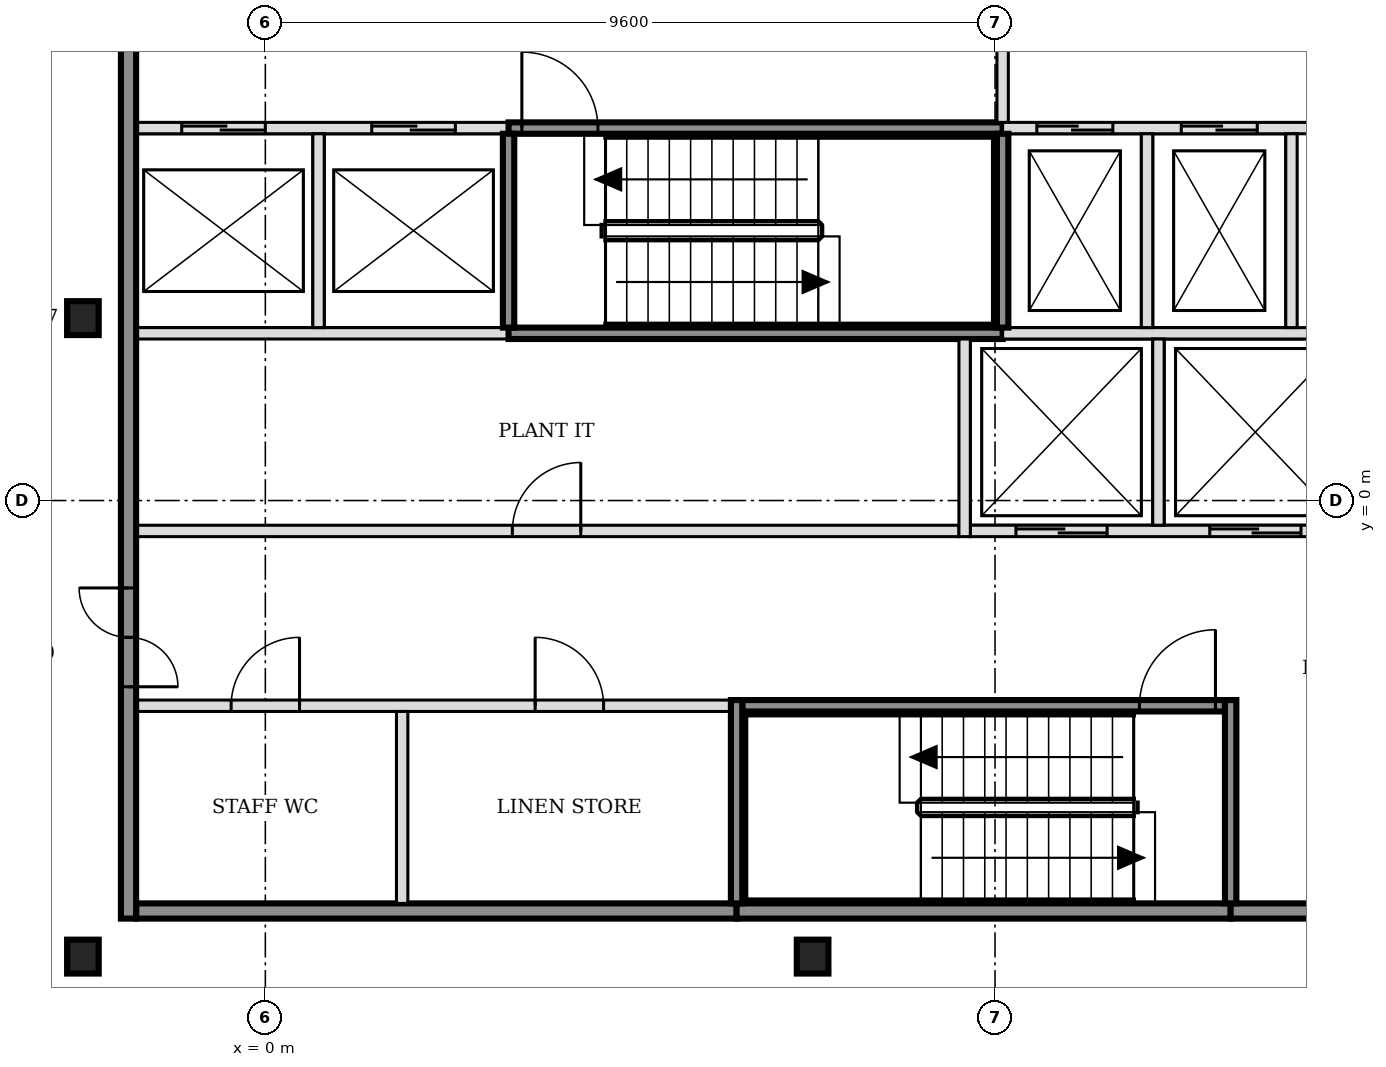
"""IFC4 building model, lengths in metres.
Left out: names, types, materials, properties, quantities, classifications, styles, units other than length and angle.
Written with IfcOpenShell. Run it as: python <this file> out.ifc"""

import sys

from ifc_helpers import new_model, si_unit, direction, frame, frame_2d, origin, origin_2d, place, context, subcontext, project, spatial, rectangle, i_section, extrude, element, fill, save


model = new_model("IFC4")
c1 = context("Model", 3, precision=1e-05, world=origin(), true_north=direction((0.0, 1.0)))
c2 = subcontext(c1, "Body", "Model", "MODEL_VIEW")
j1 = project(units=[si_unit("LENGTHUNIT", "METRE"), si_unit("PLANEANGLEUNIT", "RADIAN")], contexts=[c1])
p1 = place(None, origin())
s1 = spatial("IfcSite", under=j1, at=p1, CompositionType="ELEMENT")
p2 = place(p1, origin())
s2 = spatial("IfcBuilding", under=s1, at=p2, CompositionType="ELEMENT")
p3 = place(p2, frame((0.0, 0.0, 157.8)))
s3 = spatial("IfcBuildingStorey", under=s2, at=p3, CompositionType="ELEMENT", Elevation=157.8)
for number, where, z_axis, x_axis in (
    (1, (-2.4, -6.0, -0.15), (0.0, 0.0, 1.0), (1.0, 0.0, 0.0)),
    (2, (7.2, -6.0, -0.15), (0.0, 0.0, 1.0), (1.0, 0.0, 0.0)),
    (3, (-2.4, 2.4, -0.15), (0.0, 0.0, 1.0), (1.0, 0.0, 0.0)),
):
    element("IfcColumn", number, at=place(p3, frame(where, z_axis=z_axis, x_axis=x_axis)), inside=s3, PredefinedType="COLUMN", context=c2, shape_type="SweptSolid", body=[
        extrude(i_section(OverallWidth=0.416, OverallDepth=0.446, WebThickness=0.039, FlangeThickness=0.063, FilletRadius=0.015, at=origin_2d()), origin(), (0.0, 0.0, 1.0), 3.6),
    ])
p4 = place(p3, frame((-1.7, -5.4, 0.0), z_axis=(0.0, 0.0, 1.0), x_axis=(1.0, 0.0, 0.0)))
e4 = element("IfcWall", 4, at=p4, inside=s3, PredefinedType="SOLIDWALL", context=c2, shape_type="SweptSolid", body=[
    extrude(rectangle(XDim=7.9, YDim=0.2, at=frame_2d((3.95, 0.0))), origin(), (0.0, 0.0, 1.0), 3.45),
])
p5 = place(p3, frame((6.2, -5.4, 0.0), z_axis=(0.0, 0.0, 1.0), x_axis=(1.0, 0.0, 0.0)))
e5 = element("IfcWall", 5, at=p5, inside=s3, PredefinedType="SOLIDWALL", context=c2, shape_type="SweptSolid", body=[
    extrude(rectangle(XDim=6.5, YDim=0.2, at=frame_2d((3.25, 0.0))), origin(), (0.0, 0.0, 1.0), 3.45),
])
p6 = place(p3, frame((12.7, -5.4, 0.0), z_axis=(0.0, 0.0, 1.0), x_axis=(1.0, 0.0, 0.0)))
e6 = element("IfcWall", 6, at=p6, inside=s3, PredefinedType="SOLIDWALL", context=c2, shape_type="SweptSolid", body=[
    extrude(rectangle(XDim=3.4, YDim=0.2, at=frame_2d((1.7, 0.0))), origin(), (0.0, 0.0, 1.0), 3.45),
])
p7 = place(p3, frame((-1.7, -2.7, 0.0), z_axis=(0.0, 0.0, 1.0), x_axis=(1.0, 0.0, 0.0)))
e7 = element("IfcWall", 7, at=p7, inside=s3, PredefinedType="PARTITIONING", context=c2, shape_type="SweptSolid", body=[
    extrude(rectangle(XDim=7.825, YDim=0.15, at=frame_2d((3.913, 0.0))), origin(), (0.0, 0.0, 1.0), 3.45),
])
p8 = place(p7, frame((1.25, 0.0, 0.0)))
e8 = element("IfcOpeningElement", 8, at=p8, cuts=e7, PredefinedType="OPENING", context=c2, shape_type="SweptSolid", body=[
    extrude(rectangle(XDim=0.9, YDim=2.1, at=frame_2d((0.45, 1.05))), frame((0.0, 0.085, 0.0), z_axis=(0.0, -1.0, 0.0), x_axis=(1.0, 0.0, 0.0)), (0.0, 0.0, 1.0), 0.17),
])
p9 = place(p7, frame((5.25, 0.0, 0.0)))
e9 = element("IfcOpeningElement", 9, at=p9, cuts=e7, PredefinedType="OPENING", context=c2, shape_type="SweptSolid", body=[
    extrude(rectangle(XDim=0.9, YDim=2.1, at=frame_2d((0.45, 1.05))), frame((0.0, 0.085, 0.0), z_axis=(0.0, -1.0, 0.0), x_axis=(1.0, 0.0, 0.0)), (0.0, 0.0, 1.0), 0.17),
])
p10 = place(p3, frame((6.275, -2.7, 0.0), z_axis=(0.0, 0.0, 1.0), x_axis=(1.0, 0.0, 0.0)))
e10 = element("IfcWall", 10, at=p10, inside=s3, PredefinedType="SOLIDWALL", context=c2, shape_type="SweptSolid", body=[
    extrude(rectangle(XDim=6.35, YDim=0.15, at=frame_2d((3.175, 0.0))), origin(), (0.0, 0.0, 1.0), 3.45),
])
p11 = place(p10, frame((5.225, 0.0, 0.0)))
e11 = element("IfcOpeningElement", 11, at=p11, cuts=e10, PredefinedType="OPENING", context=c2, shape_type="SweptSolid", body=[
    extrude(rectangle(XDim=1.0, YDim=2.1, at=frame_2d((0.5, 1.05))), frame((0.0, 0.085, 0.0), z_axis=(0.0, -1.0, 0.0), x_axis=(1.0, 0.0, 0.0)), (0.0, 0.0, 1.0), 0.17),
])
p12 = place(p3, frame((-1.7, -0.4, 0.0), z_axis=(0.0, 0.0, 1.0), x_axis=(1.0, 0.0, 0.0)))
e12 = element("IfcWall", 12, at=p12, inside=s3, PredefinedType="PARTITIONING", context=c2, shape_type="SweptSolid", body=[
    extrude(rectangle(XDim=10.825, YDim=0.15, at=frame_2d((5.413, 0.0))), origin(), (0.0, 0.0, 1.0), 3.45),
])
p13 = place(p12, frame((4.95, 0.0, 0.0)))
e13 = element("IfcOpeningElement", 13, at=p13, cuts=e12, PredefinedType="OPENING", context=c2, shape_type="SweptSolid", body=[
    extrude(rectangle(XDim=0.9, YDim=2.1, at=frame_2d((0.45, 1.05))), frame((0.0, 0.085, 0.0), z_axis=(0.0, -1.0, 0.0), x_axis=(1.0, 0.0, 0.0)), (0.0, 0.0, 1.0), 0.17),
])
p14 = place(p3, frame((9.275, -0.4, 0.0), z_axis=(0.0, 0.0, 1.0), x_axis=(1.0, 0.0, 0.0)))
e14 = element("IfcWall", 14, at=p14, inside=s3, PredefinedType="SOLIDWALL", context=c2, shape_type="SweptSolid", body=[
    extrude(rectangle(XDim=4.95, YDim=0.15, at=frame_2d((2.475, 0.0))), origin(), (0.0, 0.0, 1.0), 3.45),
])
p15 = place(p14, frame((0.6, 0.0, 0.0)))
e15 = element("IfcOpeningElement", 15, at=p15, cuts=e14, PredefinedType="OPENING", context=c2, shape_type="SweptSolid", body=[
    extrude(rectangle(XDim=1.2, YDim=2.1, at=frame_2d((0.6, 1.05))), frame((0.0, 0.085, 0.0), z_axis=(0.0, -1.0, 0.0), x_axis=(1.0, 0.0, 0.0)), (0.0, 0.0, 1.0), 0.17),
])
p16 = place(p14, frame((3.15, 0.0, 0.0)))
e16 = element("IfcOpeningElement", 16, at=p16, cuts=e14, PredefinedType="OPENING", context=c2, shape_type="SweptSolid", body=[
    extrude(rectangle(XDim=1.2, YDim=2.1, at=frame_2d((0.6, 1.05))), frame((0.0, 0.085, 0.0), z_axis=(0.0, -1.0, 0.0), x_axis=(1.0, 0.0, 0.0)), (0.0, 0.0, 1.0), 0.17),
])
p17 = place(p3, frame((-1.7, 2.2, 0.0), z_axis=(0.0, 0.0, 1.0), x_axis=(1.0, 0.0, 0.0)))
e17 = element("IfcWall", 17, at=p17, inside=s3, PredefinedType="SOLIDWALL", context=c2, shape_type="SweptSolid", body=[
    extrude(rectangle(XDim=4.9, YDim=0.15, at=frame_2d((2.45, 0.0))), origin(), (0.0, 0.0, 1.0), 3.45),
])
p18 = place(p3, frame((3.2, 2.2, 0.0), z_axis=(0.0, 0.0, 1.0), x_axis=(1.0, 0.0, 0.0)))
e18 = element("IfcWall", 18, at=p18, inside=s3, PredefinedType="SOLIDWALL", context=c2, shape_type="SweptSolid", body=[
    extrude(rectangle(XDim=6.5, YDim=0.15, at=frame_2d((3.25, 0.0))), origin(), (0.0, 0.0, 1.0), 3.45),
])
p19 = place(p3, frame((9.7, 2.2, 0.0), z_axis=(0.0, 0.0, 1.0), x_axis=(1.0, 0.0, 0.0)))
e19 = element("IfcWall", 19, at=p19, inside=s3, PredefinedType="SOLIDWALL", context=c2, shape_type="SweptSolid", body=[
    extrude(rectangle(XDim=4.525, YDim=0.15, at=frame_2d((2.263, 0.0))), origin(), (0.0, 0.0, 1.0), 3.45),
])
p20 = place(p3, frame((-1.7, 4.9, 0.0), z_axis=(0.0, 0.0, 1.0), x_axis=(1.0, 0.0, 0.0)))
e20 = element("IfcWall", 20, at=p20, inside=s3, PredefinedType="SOLIDWALL", context=c2, shape_type="SweptSolid", body=[
    extrude(rectangle(XDim=4.9, YDim=0.15, at=frame_2d((2.45, 0.0))), origin(), (0.0, 0.0, 1.0), 3.45),
])
p21 = place(p20, frame((0.6, 0.0, 0.0)))
e21 = element("IfcOpeningElement", 21, at=p21, cuts=e20, PredefinedType="OPENING", context=c2, shape_type="SweptSolid", body=[
    extrude(rectangle(XDim=1.1, YDim=2.1, at=frame_2d((0.55, 1.05))), frame((0.0, 0.085, 0.0), z_axis=(0.0, -1.0, 0.0), x_axis=(1.0, 0.0, 0.0)), (0.0, 0.0, 1.0), 0.17),
])
p22 = place(p20, frame((3.1, 0.0, 0.0)))
e22 = element("IfcOpeningElement", 22, at=p22, cuts=e20, PredefinedType="OPENING", context=c2, shape_type="SweptSolid", body=[
    extrude(rectangle(XDim=1.1, YDim=2.1, at=frame_2d((0.55, 1.05))), frame((0.0, 0.085, 0.0), z_axis=(0.0, -1.0, 0.0), x_axis=(1.0, 0.0, 0.0)), (0.0, 0.0, 1.0), 0.17),
])
p23 = place(p3, frame((3.2, 4.9, 0.0), z_axis=(0.0, 0.0, 1.0), x_axis=(1.0, 0.0, 0.0)))
e23 = element("IfcWall", 23, at=p23, inside=s3, PredefinedType="SOLIDWALL", context=c2, shape_type="SweptSolid", body=[
    extrude(rectangle(XDim=6.5, YDim=0.15, at=frame_2d((3.25, 0.0))), origin(), (0.0, 0.0, 1.0), 3.45),
])
p24 = place(p23, frame((0.175, 0.0, 0.0)))
e24 = element("IfcOpeningElement", 24, at=p24, cuts=e23, PredefinedType="OPENING", context=c2, shape_type="SweptSolid", body=[
    extrude(rectangle(XDim=1.0, YDim=2.1, at=frame_2d((0.5, 1.05))), frame((0.0, 0.085, 0.0), z_axis=(0.0, -1.0, 0.0), x_axis=(1.0, 0.0, 0.0)), (0.0, 0.0, 1.0), 0.17),
])
p25 = place(p3, frame((9.7, 4.9, 0.0), z_axis=(0.0, 0.0, 1.0), x_axis=(1.0, 0.0, 0.0)))
e25 = element("IfcWall", 25, at=p25, inside=s3, PredefinedType="SOLIDWALL", context=c2, shape_type="SweptSolid", body=[
    extrude(rectangle(XDim=6.4, YDim=0.15, at=frame_2d((3.2, 0.0))), origin(), (0.0, 0.0, 1.0), 3.45),
])
p26 = place(p25, frame((0.45, 0.0, 0.0)))
e26 = element("IfcOpeningElement", 26, at=p26, cuts=e25, PredefinedType="OPENING", context=c2, shape_type="SweptSolid", body=[
    extrude(rectangle(XDim=1.0, YDim=2.1, at=frame_2d((0.5, 1.05))), frame((0.0, 0.085, 0.0), z_axis=(0.0, -1.0, 0.0), x_axis=(1.0, 0.0, 0.0)), (0.0, 0.0, 1.0), 0.17),
])
p27 = place(p25, frame((2.35, 0.0, 0.0)))
e27 = element("IfcOpeningElement", 27, at=p27, cuts=e25, PredefinedType="OPENING", context=c2, shape_type="SweptSolid", body=[
    extrude(rectangle(XDim=1.0, YDim=2.1, at=frame_2d((0.5, 1.05))), frame((0.0, 0.085, 0.0), z_axis=(0.0, -1.0, 0.0), x_axis=(1.0, 0.0, 0.0)), (0.0, 0.0, 1.0), 0.17),
])
p28 = place(p25, frame((4.7, 0.0, 0.0)))
e28 = element("IfcOpeningElement", 28, at=p28, cuts=e25, PredefinedType="OPENING", context=c2, shape_type="SweptSolid", body=[
    extrude(rectangle(XDim=0.9, YDim=2.1, at=frame_2d((0.45, 1.05))), frame((0.0, 0.085, 0.0), z_axis=(0.0, -1.0, 0.0), x_axis=(1.0, 0.0, 0.0)), (0.0, 0.0, 1.0), 0.17),
])
p29 = place(p3, frame((-1.8, -5.5, 0.0), z_axis=(0.0, 0.0, 1.0), x_axis=(0.0, 1.0, 0.0)))
e29 = element("IfcWall", 29, at=p29, inside=s3, PredefinedType="SOLIDWALL", context=c2, shape_type="SweptSolid", body=[
    extrude(rectangle(XDim=15.8, YDim=0.2, at=frame_2d((7.9, 0.0))), origin(), (0.0, 0.0, 1.0), 3.45),
])
p30 = place(p29, frame((3.05, 0.0, 0.0)))
e30 = element("IfcOpeningElement", 30, at=p30, cuts=e29, PredefinedType="OPENING", context=c2, shape_type="SweptSolid", body=[
    extrude(rectangle(XDim=1.3, YDim=2.1, at=frame_2d((0.65, 1.05))), frame((0.0, 0.11, 0.0), z_axis=(0.0, -1.0, 0.0), x_axis=(1.0, 0.0, 0.0)), (0.0, 0.0, 1.0), 0.22),
])
p31 = place(p29, frame((11.45, 0.0, 0.0)))
e31 = element("IfcOpeningElement", 31, at=p31, cuts=e29, PredefinedType="OPENING", context=c2, shape_type="SweptSolid", body=[
    extrude(rectangle(XDim=1.3, YDim=2.1, at=frame_2d((0.65, 1.05))), frame((0.0, 0.11, 0.0), z_axis=(0.0, -1.0, 0.0), x_axis=(1.0, 0.0, 0.0)), (0.0, 0.0, 1.0), 0.22),
])
p32 = place(p3, frame((0.7, 2.275, 0.0), z_axis=(0.0, 0.0, 1.0), x_axis=(0.0, 1.0, 0.0)))
e32 = element("IfcWall", 32, at=p32, inside=s3, PredefinedType="SOLIDWALL", context=c2, shape_type="SweptSolid", body=[
    extrude(rectangle(XDim=2.55, YDim=0.15, at=frame_2d((1.275, 0.0))), origin(), (0.0, 0.0, 1.0), 3.45),
])
p33 = place(p3, frame((1.8, -5.3, 0.0), z_axis=(0.0, 0.0, 1.0), x_axis=(0.0, 1.0, 0.0)))
e33 = element("IfcWall", 33, at=p33, inside=s3, PredefinedType="PARTITIONING", context=c2, shape_type="SweptSolid", body=[
    extrude(rectangle(XDim=2.525, YDim=0.15, at=frame_2d((1.263, 0.0))), origin(), (0.0, 0.0, 1.0), 3.45),
])
p34 = place(p3, frame((3.2, 2.275, 0.0), z_axis=(0.0, 0.0, 1.0), x_axis=(0.0, 1.0, 0.0)))
e34 = element("IfcWall", 34, at=p34, inside=s3, PredefinedType="SOLIDWALL", context=c2, shape_type="SweptSolid", body=[
    extrude(rectangle(XDim=2.55, YDim=0.15, at=frame_2d((1.275, 0.0))), origin(), (0.0, 0.0, 1.0), 3.45),
])
p35 = place(p3, frame((6.2, -5.3, 0.0), z_axis=(0.0, 0.0, 1.0), x_axis=(0.0, 1.0, 0.0)))
e35 = element("IfcWall", 35, at=p35, inside=s3, PredefinedType="SOLIDWALL", context=c2, shape_type="SweptSolid", body=[
    extrude(rectangle(XDim=2.675, YDim=0.15, at=frame_2d((1.337, 0.0))), origin(), (0.0, 0.0, 1.0), 3.45),
])
p36 = place(p3, frame((9.2, -0.475, 0.0), z_axis=(0.0, 0.0, 1.0), x_axis=(0.0, 1.0, 0.0)))
e36 = element("IfcWall", 36, at=p36, inside=s3, PredefinedType="SOLIDWALL", context=c2, shape_type="SweptSolid", body=[
    extrude(rectangle(XDim=2.6, YDim=0.15, at=frame_2d((1.3, 0.0))), origin(), (0.0, 0.0, 1.0), 3.45),
])
p37 = place(p3, frame((9.7, 2.275, 0.0), z_axis=(0.0, 0.0, 1.0), x_axis=(0.0, 1.0, 0.0)))
e37 = element("IfcWall", 37, at=p37, inside=s3, PredefinedType="SOLIDWALL", context=c2, shape_type="SweptSolid", body=[
    extrude(rectangle(XDim=2.55, YDim=0.15, at=frame_2d((1.275, 0.0))), origin(), (0.0, 0.0, 1.0), 3.45),
])
p38 = place(p3, frame((9.7, 4.975, 0.0), z_axis=(0.0, 0.0, 1.0), x_axis=(0.0, 1.0, 0.0)))
e38 = element("IfcWall", 38, at=p38, inside=s3, PredefinedType="SOLIDWALL", context=c2, shape_type="SweptSolid", body=[
    extrude(rectangle(XDim=2.45, YDim=0.15, at=frame_2d((1.225, 0.0))), origin(), (0.0, 0.0, 1.0), 3.45),
])
p39 = place(p3, frame((11.6, 2.275, 0.0), z_axis=(0.0, 0.0, 1.0), x_axis=(0.0, 1.0, 0.0)))
e39 = element("IfcWall", 39, at=p39, inside=s3, PredefinedType="SOLIDWALL", context=c2, shape_type="SweptSolid", body=[
    extrude(rectangle(XDim=2.55, YDim=0.15, at=frame_2d((1.275, 0.0))), origin(), (0.0, 0.0, 1.0), 3.45),
])
p40 = place(p3, frame((11.75, -0.325, 0.0), z_axis=(0.0, 0.0, 1.0), x_axis=(0.0, 1.0, 0.0)))
e40 = element("IfcWall", 40, at=p40, inside=s3, PredefinedType="SOLIDWALL", context=c2, shape_type="SweptSolid", body=[
    extrude(rectangle(XDim=2.45, YDim=0.15, at=frame_2d((1.225, 0.0))), origin(), (0.0, 0.0, 1.0), 3.45),
])
p41 = place(p3, frame((12.7, -5.3, 0.0), z_axis=(0.0, 0.0, 1.0), x_axis=(0.0, 1.0, 0.0)))
e41 = element("IfcWall", 41, at=p41, inside=s3, PredefinedType="SOLIDWALL", context=c2, shape_type="SweptSolid", body=[
    extrude(rectangle(XDim=2.675, YDim=0.15, at=frame_2d((1.337, 0.0))), origin(), (0.0, 0.0, 1.0), 3.45),
])
p42 = place(p3, frame((13.5, 2.275, 0.0), z_axis=(0.0, 0.0, 1.0), x_axis=(0.0, 1.0, 0.0)))
e42 = element("IfcWall", 42, at=p42, inside=s3, PredefinedType="SOLIDWALL", context=c2, shape_type="SweptSolid", body=[
    extrude(rectangle(XDim=2.55, YDim=0.15, at=frame_2d((1.275, 0.0))), origin(), (0.0, 0.0, 1.0), 3.45),
])
p43 = place(p15, origin())
e43 = element("IfcDoor", 43, at=p43, inside=s3, OperationType="DOUBLE_DOOR_SLIDING", PredefinedType="DOOR", context=c2, shape_type="SweptSolid", body=[
    extrude(rectangle(XDim=1.2, YDim=2.1, at=frame_2d((0.6, 1.05))), frame((0.0, 0.025, 0.0), z_axis=(0.0, -1.0, 0.0), x_axis=(1.0, 0.0, 0.0)), (0.0, 0.0, 1.0), 0.05),
])
fill(e15, e43)
p44 = place(p16, origin())
e44 = element("IfcDoor", 44, at=p44, inside=s3, OperationType="DOUBLE_DOOR_SLIDING", PredefinedType="DOOR", context=c2, shape_type="SweptSolid", body=[
    extrude(rectangle(XDim=1.2, YDim=2.1, at=frame_2d((0.6, 1.05))), frame((0.0, 0.025, 0.0), z_axis=(0.0, -1.0, 0.0), x_axis=(1.0, 0.0, 0.0)), (0.0, 0.0, 1.0), 0.05),
])
fill(e16, e44)
p45 = place(p21, origin())
e45 = element("IfcDoor", 45, at=p45, inside=s3, OperationType="DOUBLE_DOOR_SLIDING", PredefinedType="DOOR", context=c2, shape_type="SweptSolid", body=[
    extrude(rectangle(XDim=1.1, YDim=2.1, at=frame_2d((0.55, 1.05))), frame((0.0, 0.025, 0.0), z_axis=(0.0, -1.0, 0.0), x_axis=(1.0, 0.0, 0.0)), (0.0, 0.0, 1.0), 0.05),
])
fill(e21, e45)
p46 = place(p22, origin())
e46 = element("IfcDoor", 46, at=p46, inside=s3, OperationType="DOUBLE_DOOR_SLIDING", PredefinedType="DOOR", context=c2, shape_type="SweptSolid", body=[
    extrude(rectangle(XDim=1.1, YDim=2.1, at=frame_2d((0.55, 1.05))), frame((0.0, 0.025, 0.0), z_axis=(0.0, -1.0, 0.0), x_axis=(1.0, 0.0, 0.0)), (0.0, 0.0, 1.0), 0.05),
])
fill(e22, e46)
p47 = place(p26, origin())
e47 = element("IfcDoor", 47, at=p47, inside=s3, OperationType="DOUBLE_DOOR_SLIDING", PredefinedType="DOOR", context=c2, shape_type="SweptSolid", body=[
    extrude(rectangle(XDim=1.0, YDim=2.1, at=frame_2d((0.5, 1.05))), frame((0.0, 0.025, 0.0), z_axis=(0.0, -1.0, 0.0), x_axis=(1.0, 0.0, 0.0)), (0.0, 0.0, 1.0), 0.05),
])
fill(e26, e47)
p48 = place(p27, origin())
e48 = element("IfcDoor", 48, at=p48, inside=s3, OperationType="DOUBLE_DOOR_SLIDING", PredefinedType="DOOR", context=c2, shape_type="SweptSolid", body=[
    extrude(rectangle(XDim=1.0, YDim=2.1, at=frame_2d((0.5, 1.05))), frame((0.0, 0.025, 0.0), z_axis=(0.0, -1.0, 0.0), x_axis=(1.0, 0.0, 0.0)), (0.0, 0.0, 1.0), 0.05),
])
fill(e27, e48)
p49 = place(p11, origin())
e49 = element("IfcDoor", 49, at=p49, inside=s3, OperationType="SINGLE_SWING_RIGHT", PredefinedType="DOOR", context=c2, shape_type="SweptSolid", body=[
    extrude(rectangle(XDim=1.0, YDim=2.1, at=frame_2d((0.5, 1.05))), frame((0.0, 0.025, 0.0), z_axis=(0.0, -1.0, 0.0), x_axis=(1.0, 0.0, 0.0)), (0.0, 0.0, 1.0), 0.05),
])
fill(e11, e49)
p50 = place(p24, origin())
e50 = element("IfcDoor", 50, at=p50, inside=s3, OperationType="SINGLE_SWING_LEFT", PredefinedType="DOOR", context=c2, shape_type="SweptSolid", body=[
    extrude(rectangle(XDim=1.0, YDim=2.1, at=frame_2d((0.5, 1.05))), frame((0.0, 0.025, 0.0), z_axis=(0.0, -1.0, 0.0), x_axis=(1.0, 0.0, 0.0)), (0.0, 0.0, 1.0), 0.05),
])
fill(e24, e50)
p51 = place(p30, origin())
e51 = element("IfcDoor", 51, at=p51, inside=s3, OperationType="DOUBLE_DOOR_SINGLE_SWING", PredefinedType="DOOR", context=c2, shape_type="SweptSolid", body=[
    extrude(rectangle(XDim=1.3, YDim=2.1, at=frame_2d((0.65, 1.05))), frame((0.0, 0.025, 0.0), z_axis=(0.0, -1.0, 0.0), x_axis=(1.0, 0.0, 0.0)), (0.0, 0.0, 1.0), 0.05),
])
fill(e30, e51)
p52 = place(p8, origin())
e52 = element("IfcDoor", 52, at=p52, inside=s3, OperationType="SINGLE_SWING_RIGHT", PredefinedType="DOOR", context=c2, shape_type="SweptSolid", body=[
    extrude(rectangle(XDim=0.9, YDim=2.1, at=frame_2d((0.45, 1.05))), frame((0.0, 0.025, 0.0), z_axis=(0.0, -1.0, 0.0), x_axis=(1.0, 0.0, 0.0)), (0.0, 0.0, 1.0), 0.05),
])
fill(e8, e52)
p53 = place(p9, origin())
e53 = element("IfcDoor", 53, at=p53, inside=s3, OperationType="SINGLE_SWING_LEFT", PredefinedType="DOOR", context=c2, shape_type="SweptSolid", body=[
    extrude(rectangle(XDim=0.9, YDim=2.1, at=frame_2d((0.45, 1.05))), frame((0.0, 0.025, 0.0), z_axis=(0.0, -1.0, 0.0), x_axis=(1.0, 0.0, 0.0)), (0.0, 0.0, 1.0), 0.05),
])
fill(e9, e53)
p54 = place(p13, origin())
e54 = element("IfcDoor", 54, at=p54, inside=s3, OperationType="SINGLE_SWING_RIGHT", PredefinedType="DOOR", context=c2, shape_type="SweptSolid", body=[
    extrude(rectangle(XDim=0.9, YDim=2.1, at=frame_2d((0.45, 1.05))), frame((0.0, 0.025, 0.0), z_axis=(0.0, -1.0, 0.0), x_axis=(1.0, 0.0, 0.0)), (0.0, 0.0, 1.0), 0.05),
])
fill(e13, e54)
save(model, sys.argv[1])
